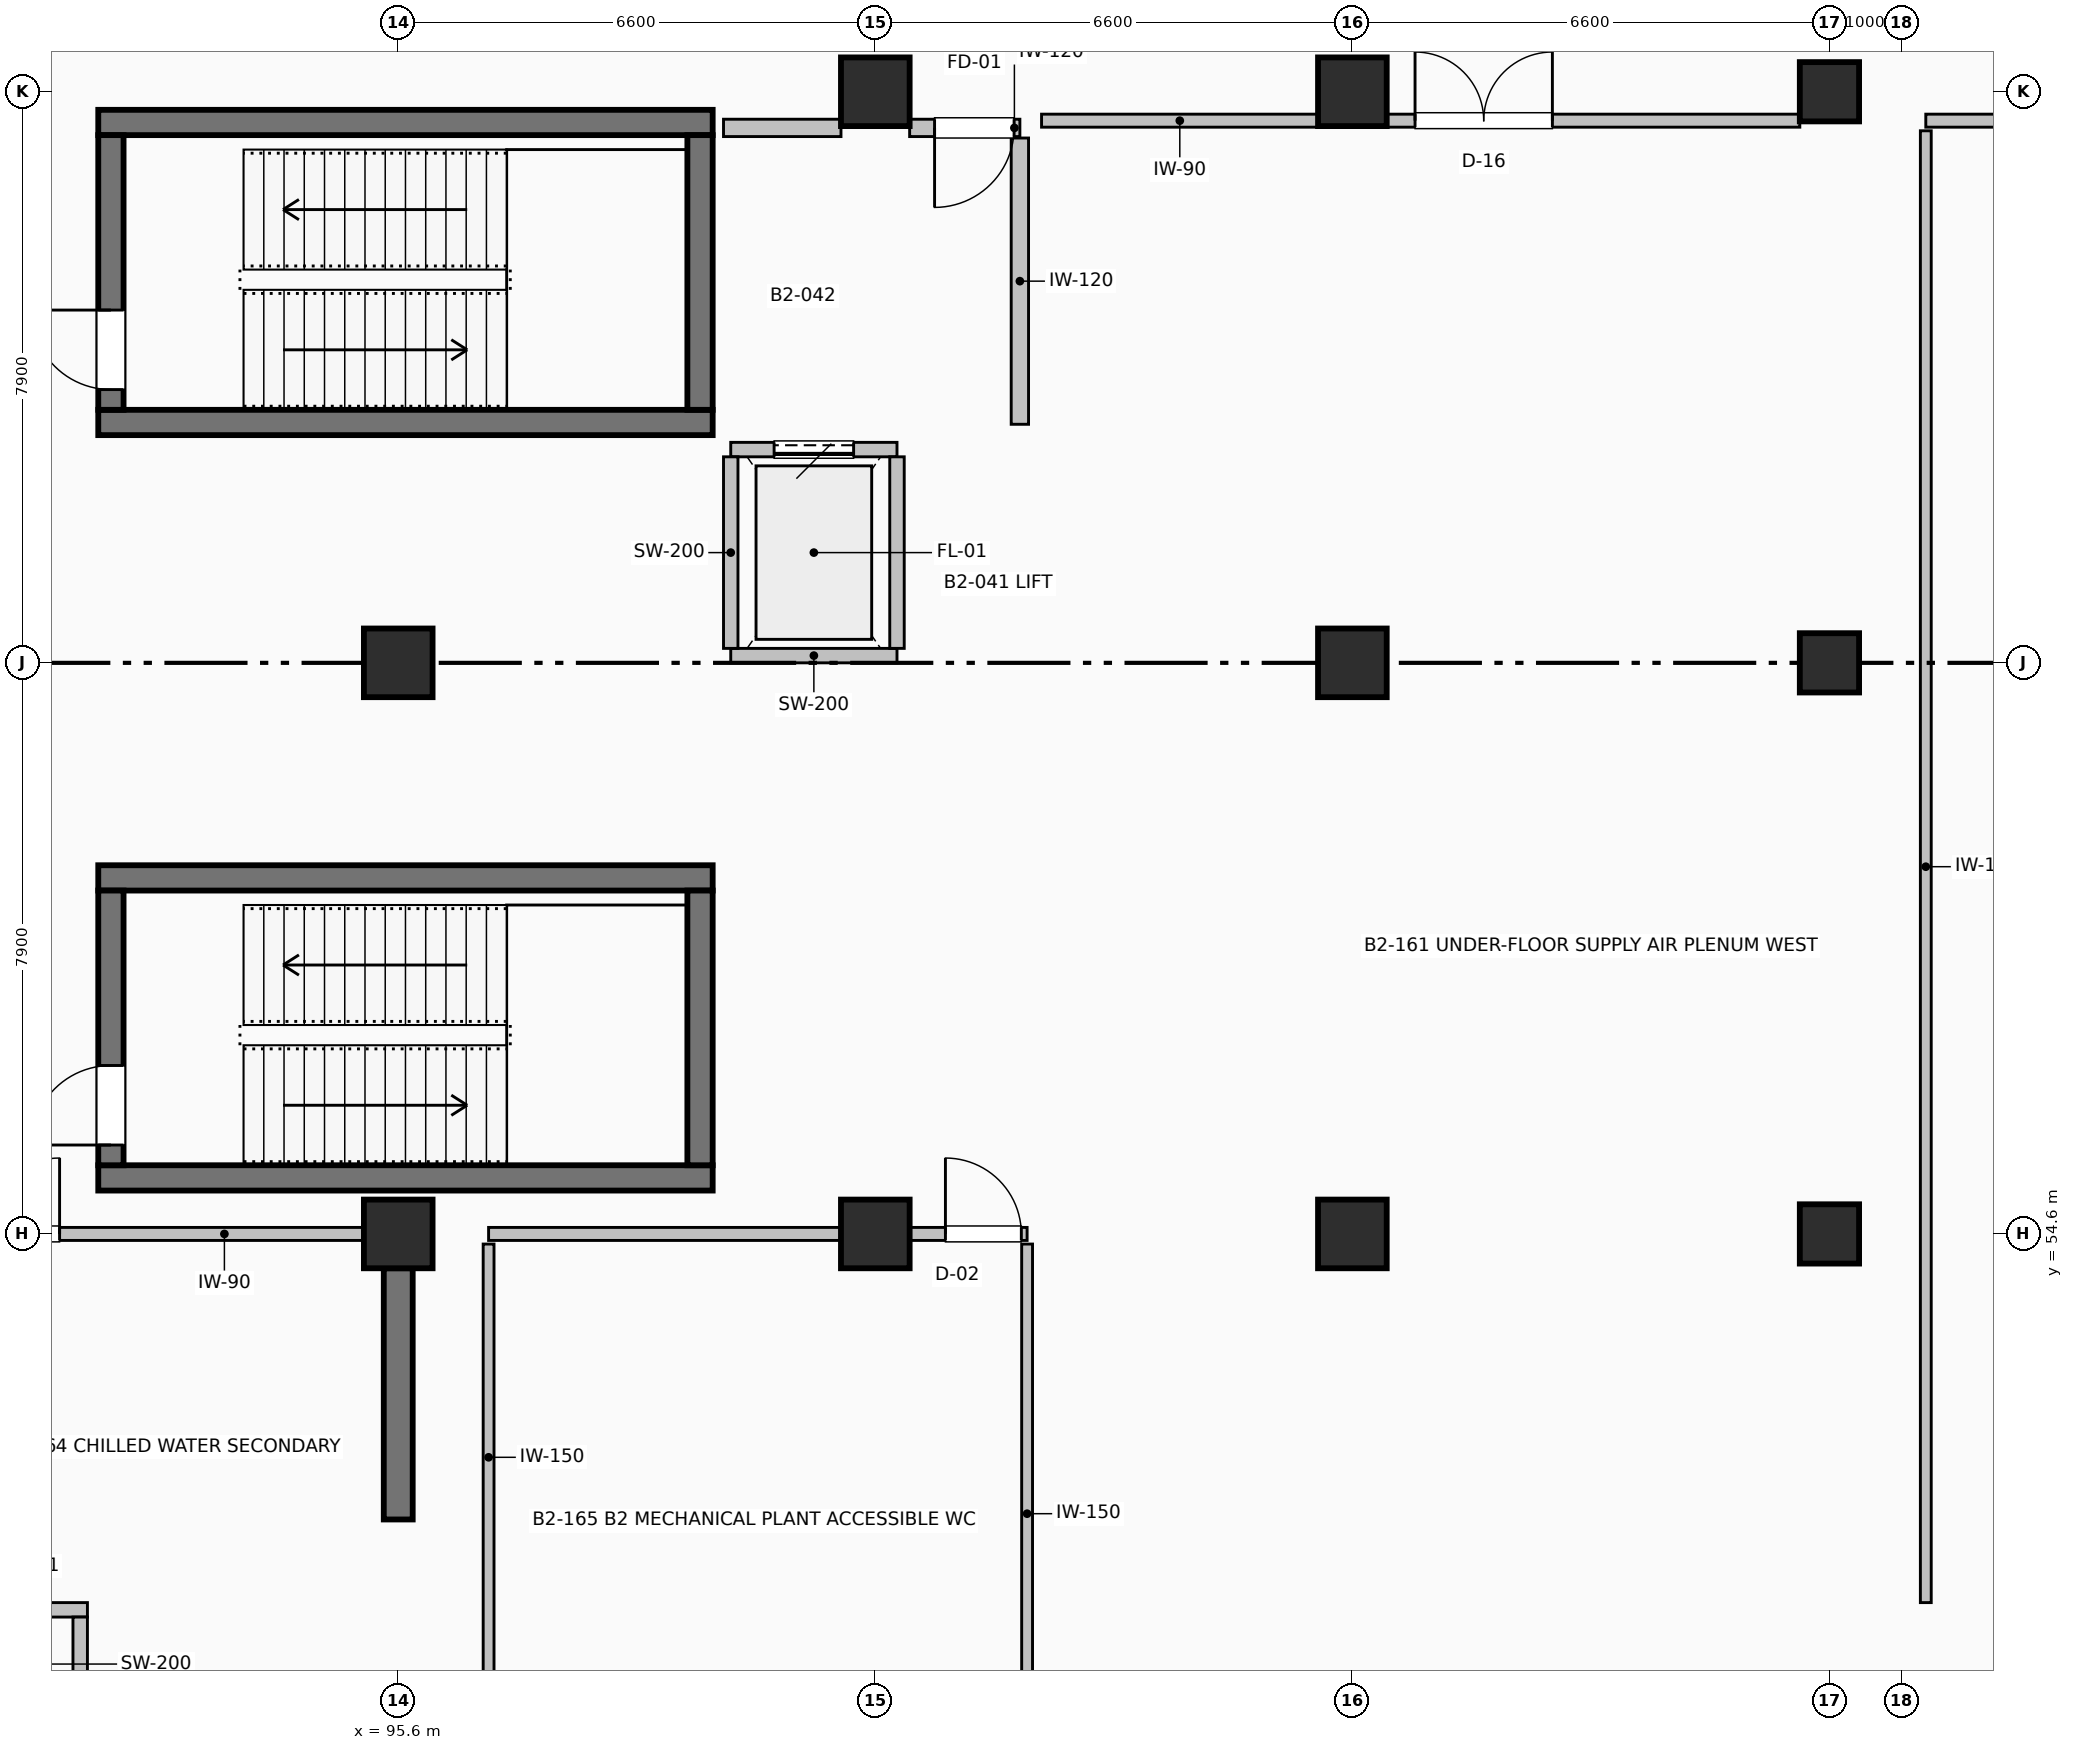
"""IFC4 building model, lengths in metres.
Left out: names, types, materials, properties, quantities, classifications, styles, units other than length and angle.
Written with IfcOpenShell. Run it as: python <this file> out.ifc"""

import sys

from ifc_helpers import new_model, si_unit, direction, frame, frame_2d, origin, origin_2d, place, context, subcontext, project, spatial, rectangle, extrude, element, fill, save


model = new_model("IFC4")
c1 = context("Model", 3, precision=1e-05, world=origin(), true_north=direction((0.0, 1.0)))
c2 = subcontext(c1, "Body", "Model", "MODEL_VIEW")
j1 = project(units=[si_unit("LENGTHUNIT", "METRE"), si_unit("PLANEANGLEUNIT", "RADIAN")], contexts=[c1])
p1 = place(None, origin())
s1 = spatial("IfcSite", under=j1, at=p1, CompositionType="ELEMENT")
p2 = place(p1, origin())
s2 = spatial("IfcBuilding", under=s1, at=p2, CompositionType="ELEMENT")
p3 = place(p2, frame((0.0, 0.0, -9.6)))
s3 = spatial("IfcBuildingStorey", under=s2, at=p3, CompositionType="ELEMENT", Elevation=-9.6)
for number, where, z_axis, x_axis in (
    (1, (95.6, 54.6, 0.0), (0.0, 0.0, 1.0), (1.0, 0.0, 0.0)),
    (2, (95.6, 62.5, 0.0), (0.0, 0.0, 1.0), (1.0, 0.0, 0.0)),
    (3, (102.2, 54.6, 0.0), (0.0, 0.0, 1.0), (1.0, 0.0, 0.0)),
    (4, (102.2, 70.4, 0.0), (0.0, 0.0, 1.0), (1.0, 0.0, 0.0)),
    (5, (108.8, 54.6, 0.0), (0.0, 0.0, 1.0), (1.0, 0.0, 0.0)),
    (6, (108.8, 62.5, 0.0), (0.0, 0.0, 1.0), (1.0, 0.0, 0.0)),
    (7, (108.8, 70.4, 0.0), (0.0, 0.0, 1.0), (1.0, 0.0, 0.0)),
):
    element("IfcColumn", number, at=place(p3, frame(where, z_axis=z_axis, x_axis=x_axis)), inside=s3, PredefinedType="COLUMN", context=c2, shape_type="SweptSolid", body=[
        extrude(rectangle(XDim=0.95, YDim=0.95, at=origin_2d()), origin(), (0.0, 0.0, 1.0), 4.8),
    ])
for number, where, z_axis, x_axis in (
    (8, (115.4, 54.6, 0.0), (0.0, 0.0, 1.0), (1.0, 0.0, 0.0)),
    (9, (115.4, 62.5, 0.0), (0.0, 0.0, 1.0), (1.0, 0.0, 0.0)),
    (10, (115.4, 70.4, 0.0), (0.0, 0.0, 1.0), (1.0, 0.0, 0.0)),
):
    element("IfcColumn", number, at=place(p3, frame(where, z_axis=z_axis, x_axis=x_axis)), inside=s3, PredefinedType="COLUMN", context=c2, shape_type="SweptSolid", body=[
        extrude(rectangle(XDim=0.82, YDim=0.82, at=origin_2d()), origin(), (0.0, 0.0, 1.0), 4.8),
    ])
for number, where, z_axis, x_axis in (
    (11, (91.45, 65.825, 0.0), (0.0, 0.0, 1.0), (1.0, 0.0, 0.0)),
    (12, (99.95, 69.975, 0.0), (0.0, 0.0, 1.0), (-1.0, 0.0, 0.0)),
):
    element("IfcWall", number, at=place(p3, frame(where, z_axis=z_axis, x_axis=x_axis)), inside=s3, PredefinedType="SHEAR", context=c2, shape_type="SweptSolid", body=[
        extrude(rectangle(XDim=8.5, YDim=0.35, at=frame_2d((4.25, 0.0))), origin(), (0.0, 0.0, 1.0), 4.5),
    ])
p4 = place(p3, frame((91.625, 66.0, 0.0), z_axis=(0.0, 0.0, 1.0), x_axis=(0.0, 1.0, 0.0)))
e13 = element("IfcWall", 13, at=p4, inside=s3, PredefinedType="SHEAR", context=c2, shape_type="SweptSolid", body=[
    extrude(rectangle(XDim=3.8, YDim=0.35, at=frame_2d((1.9, 0.0))), origin(), (0.0, 0.0, 1.0), 4.5),
])
p5 = place(p4, frame((0.28, 0.0, 0.0)))
e14 = element("IfcOpeningElement", 14, at=p5, cuts=e13, PredefinedType="OPENING", context=c2, shape_type="SweptSolid", body=[
    extrude(rectangle(XDim=1.1, YDim=2.08, at=frame_2d((0.55, 1.04))), frame((0.0, 0.185, 0.0), z_axis=(0.0, -1.0, 0.0), x_axis=(1.0, 0.0, 0.0)), (0.0, 0.0, 1.0), 0.37),
])
p6 = place(p3, frame((99.775, 69.8, 0.0), z_axis=(0.0, 0.0, 1.0), x_axis=(0.0, -1.0, 0.0)))
e15 = element("IfcWall", 15, at=p6, inside=s3, PredefinedType="SHEAR", context=c2, shape_type="SweptSolid", body=[
    extrude(rectangle(XDim=3.8, YDim=0.35, at=frame_2d((1.9, 0.0))), origin(), (0.0, 0.0, 1.0), 4.5),
])
for number, where, z_axis, x_axis in (
    (16, (91.45, 55.375, 0.0), (0.0, 0.0, 1.0), (1.0, 0.0, 0.0)),
    (17, (99.95, 59.525, 0.0), (0.0, 0.0, 1.0), (-1.0, 0.0, 0.0)),
):
    element("IfcWall", number, at=place(p3, frame(where, z_axis=z_axis, x_axis=x_axis)), inside=s3, PredefinedType="SHEAR", context=c2, shape_type="SweptSolid", body=[
        extrude(rectangle(XDim=8.5, YDim=0.35, at=frame_2d((4.25, 0.0))), origin(), (0.0, 0.0, 1.0), 4.5),
    ])
p7 = place(p3, frame((91.625, 55.55, 0.0), z_axis=(0.0, 0.0, 1.0), x_axis=(0.0, 1.0, 0.0)))
e18 = element("IfcWall", 18, at=p7, inside=s3, PredefinedType="SHEAR", context=c2, shape_type="SweptSolid", body=[
    extrude(rectangle(XDim=3.8, YDim=0.35, at=frame_2d((1.9, 0.0))), origin(), (0.0, 0.0, 1.0), 4.5),
])
p8 = place(p7, frame((0.28, 0.0, 0.0)))
e19 = element("IfcOpeningElement", 19, at=p8, cuts=e18, PredefinedType="OPENING", context=c2, shape_type="SweptSolid", body=[
    extrude(rectangle(XDim=1.1, YDim=2.08, at=frame_2d((0.55, 1.04))), frame((0.0, 0.185, 0.0), z_axis=(0.0, -1.0, 0.0), x_axis=(1.0, 0.0, 0.0)), (0.0, 0.0, 1.0), 0.37),
])
p9 = place(p3, frame((99.775, 59.35, 0.0), z_axis=(0.0, 0.0, 1.0), x_axis=(0.0, -1.0, 0.0)))
e20 = element("IfcWall", 20, at=p9, inside=s3, PredefinedType="SHEAR", context=c2, shape_type="SweptSolid", body=[
    extrude(rectangle(XDim=3.8, YDim=0.35, at=frame_2d((1.9, 0.0))), origin(), (0.0, 0.0, 1.0), 4.5),
])
p10 = place(p3, frame((95.6, 50.65, 0.0), z_axis=(0.0, 0.0, 1.0), x_axis=(0.0, 1.0, 0.0)))
e21 = element("IfcWall", 21, at=p10, inside=s3, PredefinedType="SHEAR", context=c2, shape_type="SweptSolid", body=[
    extrude(rectangle(XDim=3.475, YDim=0.4, at=frame_2d((1.738, 0.0))), origin(), (0.0, 0.0, 1.0), 4.48),
])
p11 = place(p3, frame((91.3, 49.4, 0.0), z_axis=(0.0, 0.0, 1.0), x_axis=(-1.0, 0.0, 0.0)))
e22 = element("IfcWall", 22, at=p11, inside=s3, PredefinedType="PARTITIONING", context=c2, shape_type="SweptSolid", body=[
    extrude(rectangle(XDim=1.7, YDim=0.2, at=frame_2d((0.85, 0.0))), origin(), (0.0, 0.0, 1.0), 4.5),
])
p12 = place(p3, frame((91.2, 49.3, 0.0), z_axis=(0.0, 0.0, 1.0), x_axis=(0.0, -1.0, 0.0)))
e23 = element("IfcWall", 23, at=p12, inside=s3, PredefinedType="PARTITIONING", context=c2, shape_type="SweptSolid", body=[
    extrude(rectangle(XDim=1.3, YDim=0.2, at=frame_2d((0.65, 0.0))), origin(), (0.0, 0.0, 1.0), 4.5),
])
p13 = place(p3, frame((100.2, 62.6, 0.0), z_axis=(0.0, 0.0, 1.0), x_axis=(1.0, 0.0, 0.0)))
e24 = element("IfcWall", 24, at=p13, inside=s3, PredefinedType="PARTITIONING", context=c2, shape_type="SweptSolid", body=[
    extrude(rectangle(XDim=2.3, YDim=0.2, at=frame_2d((1.15, 0.0))), origin(), (0.0, 0.0, 1.0), 3.292),
])
p14 = place(p3, frame((102.5, 65.45, 0.0), z_axis=(0.0, 0.0, 1.0), x_axis=(-1.0, 0.0, 0.0)))
e25 = element("IfcWall", 25, at=p14, inside=s3, PredefinedType="PARTITIONING", context=c2, shape_type="SweptSolid", body=[
    extrude(rectangle(XDim=2.3, YDim=0.2, at=frame_2d((1.15, 0.0))), origin(), (0.0, 0.0, 1.0), 4.492),
])
p15 = place(p14, frame((0.6, 0.0, 0.0)))
e26 = element("IfcOpeningElement", 26, at=p15, cuts=e25, PredefinedType="OPENING", context=c2, shape_type="SweptSolid", body=[
    extrude(rectangle(XDim=1.1, YDim=2.15, at=frame_2d((0.55, 1.075))), frame((0.0, 0.11, 0.0), z_axis=(0.0, -1.0, 0.0), x_axis=(1.0, 0.0, 0.0)), (0.0, 0.0, 1.0), 0.22),
])
for number, where, z_axis, x_axis in (
    (27, (100.2, 62.7, 0.0), (0.0, 0.0, 1.0), (0.0, 1.0, 0.0)),
    (28, (102.5, 65.35, 0.0), (0.0, 0.0, 1.0), (0.0, -1.0, 0.0)),
):
    element("IfcWall", number, at=place(p3, frame(where, z_axis=z_axis, x_axis=x_axis)), inside=s3, PredefinedType="PARTITIONING", context=c2, shape_type="SweptSolid", body=[
        extrude(rectangle(XDim=2.65, YDim=0.2, at=frame_2d((1.325, 0.0))), origin(), (0.0, 0.0, 1.0), 4.492),
    ])
p16 = place(p3, frame((104.2, 69.9, 0.0), z_axis=(0.0, 0.0, 1.0), x_axis=(-1.0, 0.0, 0.0)))
e29 = element("IfcWall", 29, at=p16, inside=s3, PredefinedType="PARTITIONING", context=c2, shape_type="SweptSolid", body=[
    extrude(rectangle(XDim=1.525, YDim=0.24, at=frame_2d((0.762, 0.0))), origin(), (0.0, 0.0, 1.0), 4.492),
])
p17 = place(p16, frame((0.08, 0.0, 0.0)))
e30 = element("IfcOpeningElement", 30, at=p17, cuts=e29, PredefinedType="OPENING", context=c2, shape_type="SweptSolid", body=[
    extrude(rectangle(XDim=1.1, YDim=2.08, at=frame_2d((0.55, 1.04))), frame((0.0, 0.13, 0.0), z_axis=(0.0, -1.0, 0.0), x_axis=(1.0, 0.0, 0.0)), (0.0, 0.0, 1.0), 0.26),
])
p18 = place(p3, frame((101.725, 69.9, 0.0), z_axis=(0.0, 0.0, 1.0), x_axis=(-1.0, 0.0, 0.0)))
e31 = element("IfcWall", 31, at=p18, inside=s3, PredefinedType="PARTITIONING", context=c2, shape_type="SweptSolid", body=[
    extrude(rectangle(XDim=1.625, YDim=0.24, at=frame_2d((0.812, 0.0))), origin(), (0.0, 0.0, 1.0), 4.492),
])
p19 = place(p3, frame((104.2, 69.76, 0.0), z_axis=(0.0, 0.0, 1.0), x_axis=(0.0, -1.0, 0.0)))
e32 = element("IfcWall", 32, at=p19, inside=s3, PredefinedType="PARTITIONING", context=c2, shape_type="SweptSolid", body=[
    extrude(rectangle(XDim=3.96, YDim=0.24, at=frame_2d((1.98, 0.0))), origin(), (0.0, 0.0, 1.0), 4.492),
])
p20 = place(p3, frame((104.5, 70.0, 0.0), z_axis=(0.0, 0.0, 1.0), x_axis=(1.0, 0.0, 0.0)))
e33 = element("IfcWall", 33, at=p20, inside=s3, PredefinedType="PARTITIONING", context=c2, shape_type="SweptSolid", body=[
    extrude(rectangle(XDim=3.825, YDim=0.18, at=frame_2d((1.913, 0.0))), origin(), (0.0, 0.0, 1.0), 4.492),
])
p21 = place(p3, frame((109.275, 70.0, 0.0), z_axis=(0.0, 0.0, 1.0), x_axis=(1.0, 0.0, 0.0)))
e34 = element("IfcWall", 34, at=p21, inside=s3, PredefinedType="PARTITIONING", context=c2, shape_type="SweptSolid", body=[
    extrude(rectangle(XDim=5.715, YDim=0.18, at=frame_2d((2.857, 0.0))), origin(), (0.0, 0.0, 1.0), 4.492),
])
p22 = place(p21, frame((0.392, 0.0, 0.0)))
e35 = element("IfcOpeningElement", 35, at=p22, cuts=e34, PredefinedType="OPENING", context=c2, shape_type="SweptSolid", body=[
    extrude(rectangle(XDim=1.9, YDim=2.26, at=frame_2d((0.95, 1.13))), frame((0.0, 0.1, 0.0), z_axis=(0.0, -1.0, 0.0), x_axis=(1.0, 0.0, 0.0)), (0.0, 0.0, 1.0), 0.2),
])
p23 = place(p3, frame((116.733, 49.5, 0.0), z_axis=(0.0, 0.0, 1.0), x_axis=(0.0, 1.0, 0.0)))
e36 = element("IfcWall", 36, at=p23, inside=s3, PredefinedType="PARTITIONING", context=c2, shape_type="SweptSolid", body=[
    extrude(rectangle(XDim=20.36, YDim=0.15, at=frame_2d((10.18, 0.0))), origin(), (0.0, 0.0, 1.0), 4.492),
])
p24 = place(p3, frame((116.733, 70.0, 0.0), z_axis=(0.0, 0.0, 1.0), x_axis=(1.0, 0.0, 0.0)))
e37 = element("IfcWall", 37, at=p24, inside=s3, PredefinedType="PARTITIONING", context=c2, shape_type="SweptSolid", body=[
    extrude(rectangle(XDim=4.792, YDim=0.18, at=frame_2d((2.396, 0.0))), origin(), (0.0, 0.0, 1.0), 4.492),
])
p25 = place(p3, frame((89.41, 54.6, 0.0), z_axis=(0.0, 0.0, 1.0), x_axis=(1.0, 0.0, 0.0)))
e38 = element("IfcWall", 38, at=p25, inside=s3, PredefinedType="PARTITIONING", context=c2, shape_type="SweptSolid", body=[
    extrude(rectangle(XDim=5.715, YDim=0.18, at=frame_2d((2.857, 0.0))), origin(), (0.0, 0.0, 1.0), 3.792),
])
p26 = place(p25, frame((0.455, 0.0, 0.0)))
e39 = element("IfcOpeningElement", 39, at=p26, cuts=e38, PredefinedType="OPENING", context=c2, shape_type="SweptSolid", body=[
    extrude(rectangle(XDim=1.05, YDim=2.1, at=frame_2d((0.525, 1.05))), frame((0.0, 0.1, 0.0), z_axis=(0.0, -1.0, 0.0), x_axis=(1.0, 0.0, 0.0)), (0.0, 0.0, 1.0), 0.2),
])
for number, where, z_axis, x_axis in (
    (40, (96.85, 47.0, 0.0), (0.0, 0.0, 1.0), (0.0, 1.0, 0.0)),
    (41, (104.3, 47.0, 0.0), (0.0, 0.0, 1.0), (0.0, 1.0, 0.0)),
):
    element("IfcWall", number, at=place(p3, frame(where, z_axis=z_axis, x_axis=x_axis)), inside=s3, PredefinedType="PARTITIONING", context=c2, shape_type="SweptSolid", body=[
        extrude(rectangle(XDim=7.46, YDim=0.15, at=frame_2d((3.73, 0.0))), origin(), (0.0, 0.0, 1.0), 4.492),
    ])
p27 = place(p3, frame((96.85, 54.6, 0.0), z_axis=(0.0, 0.0, 1.0), x_axis=(1.0, 0.0, 0.0)))
e42 = element("IfcWall", 42, at=p27, inside=s3, PredefinedType="PARTITIONING", context=c2, shape_type="SweptSolid", body=[
    extrude(rectangle(XDim=4.875, YDim=0.18, at=frame_2d((2.438, 0.0))), origin(), (0.0, 0.0, 1.0), 3.792),
])
p28 = place(p3, frame((102.675, 54.6, 0.0), z_axis=(0.0, 0.0, 1.0), x_axis=(1.0, 0.0, 0.0)))
e43 = element("IfcWall", 43, at=p28, inside=s3, PredefinedType="PARTITIONING", context=c2, shape_type="SweptSolid", body=[
    extrude(rectangle(XDim=1.625, YDim=0.18, at=frame_2d((0.812, 0.0))), origin(), (0.0, 0.0, 1.0), 3.792),
])
p29 = place(p28, frame((0.495, 0.0, 0.0)))
e44 = element("IfcOpeningElement", 44, at=p29, cuts=e43, PredefinedType="OPENING", context=c2, shape_type="SweptSolid", body=[
    extrude(rectangle(XDim=1.05, YDim=2.1, at=frame_2d((0.525, 1.05))), frame((0.0, 0.1, 0.0), z_axis=(0.0, -1.0, 0.0), x_axis=(1.0, 0.0, 0.0)), (0.0, 0.0, 1.0), 0.2),
])
p30 = place(p5, origin())
e45 = element("IfcDoor", 45, at=p30, inside=s3, OperationType="SINGLE_SWING_RIGHT", PredefinedType="DOOR", context=c2, shape_type="SweptSolid", body=[
    extrude(rectangle(XDim=1.1, YDim=2.08, at=frame_2d((0.55, 1.04))), frame((0.0, 0.025, 0.0), z_axis=(0.0, -1.0, 0.0), x_axis=(1.0, 0.0, 0.0)), (0.0, 0.0, 1.0), 0.05),
])
fill(e14, e45)
p31 = place(p8, origin())
e46 = element("IfcDoor", 46, at=p31, inside=s3, OperationType="SINGLE_SWING_LEFT", PredefinedType="DOOR", context=c2, shape_type="SweptSolid", body=[
    extrude(rectangle(XDim=1.1, YDim=2.08, at=frame_2d((0.55, 1.04))), frame((0.0, 0.025, 0.0), z_axis=(0.0, -1.0, 0.0), x_axis=(1.0, 0.0, 0.0)), (0.0, 0.0, 1.0), 0.05),
])
fill(e19, e46)
p32 = place(p15, origin())
e47 = element("IfcDoor", 47, at=p32, inside=s3, OperationType="SLIDING_TO_LEFT", PredefinedType="DOOR", context=c2, shape_type="SweptSolid", body=[
    extrude(rectangle(XDim=1.1, YDim=2.15, at=frame_2d((0.55, 1.075))), frame((0.0, 0.025, 0.0), z_axis=(0.0, -1.0, 0.0), x_axis=(1.0, 0.0, 0.0)), (0.0, 0.0, 1.0), 0.05),
])
fill(e26, e47)
p33 = place(p17, origin())
e48 = element("IfcDoor", 48, at=p33, inside=s3, OperationType="SINGLE_SWING_RIGHT", PredefinedType="DOOR", context=c2, shape_type="SweptSolid", body=[
    extrude(rectangle(XDim=1.1, YDim=2.08, at=frame_2d((0.55, 1.04))), frame((0.0, 0.025, 0.0), z_axis=(0.0, -1.0, 0.0), x_axis=(1.0, 0.0, 0.0)), (0.0, 0.0, 1.0), 0.05),
])
fill(e30, e48)
p34 = place(p22, origin())
e49 = element("IfcDoor", 49, at=p34, inside=s3, OperationType="DOUBLE_DOOR_SINGLE_SWING", PredefinedType="DOOR", context=c2, shape_type="SweptSolid", body=[
    extrude(rectangle(XDim=1.9, YDim=2.26, at=frame_2d((0.95, 1.13))), frame((0.0, 0.025, 0.0), z_axis=(0.0, -1.0, 0.0), x_axis=(1.0, 0.0, 0.0)), (0.0, 0.0, 1.0), 0.05),
])
fill(e35, e49)
p35 = place(p26, origin())
e50 = element("IfcDoor", 50, at=p35, inside=s3, OperationType="SINGLE_SWING_RIGHT", PredefinedType="DOOR", context=c2, shape_type="SweptSolid", body=[
    extrude(rectangle(XDim=1.05, YDim=2.1, at=frame_2d((0.525, 1.05))), frame((0.0, 0.025, 0.0), z_axis=(0.0, -1.0, 0.0), x_axis=(1.0, 0.0, 0.0)), (0.0, 0.0, 1.0), 0.05),
])
fill(e39, e50)
p36 = place(p29, origin())
e51 = element("IfcDoor", 51, at=p36, inside=s3, OperationType="SINGLE_SWING_LEFT", PredefinedType="DOOR", context=c2, shape_type="SweptSolid", body=[
    extrude(rectangle(XDim=1.05, YDim=2.1, at=frame_2d((0.525, 1.05))), frame((0.0, 0.025, 0.0), z_axis=(0.0, -1.0, 0.0), x_axis=(1.0, 0.0, 0.0)), (0.0, 0.0, 1.0), 0.05),
])
fill(e44, e51)
save(model, sys.argv[1])
